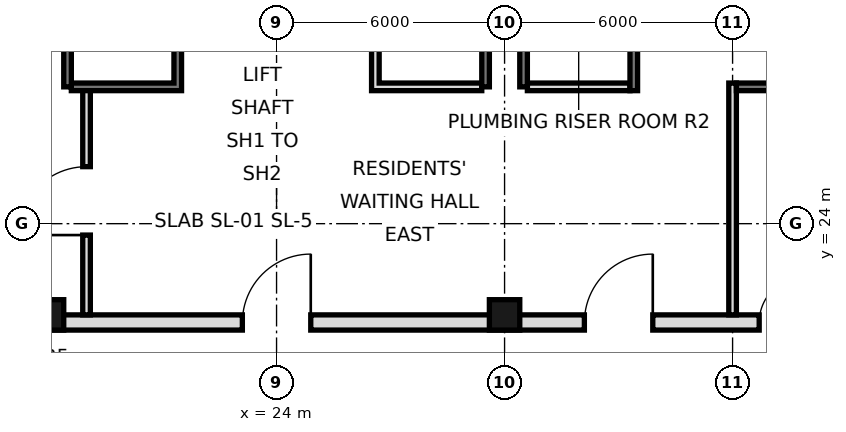
"""IFC4 building model, lengths in metres.
Left out: names, types, materials, properties, quantities, classifications, styles, units other than length and angle.
Written with IfcOpenShell. Run it as: python <this file> out.ifc"""

import sys

from ifc_helpers import new_model, si_unit, direction, frame, frame_2d, origin, origin_2d, place, context, subcontext, project, spatial, rectangle, hollow_rectangle, extrude, element, fill, save


model = new_model("IFC4")
c1 = context("Model", 3, precision=1e-05, world=origin(), true_north=direction((0.0, 1.0)))
c2 = subcontext(c1, "Body", "Model", "MODEL_VIEW")
j1 = project(units=[si_unit("LENGTHUNIT", "METRE"), si_unit("PLANEANGLEUNIT", "RADIAN")], contexts=[c1])
p1 = place(None, origin())
s1 = spatial("IfcSite", under=j1, at=p1, CompositionType="ELEMENT")
p2 = place(p1, origin())
s2 = spatial("IfcBuilding", under=s1, at=p2, CompositionType="ELEMENT")
p3 = place(p2, frame((0.0, 0.0, 34.8)))
s3 = spatial("IfcBuildingStorey", under=s2, at=p3, CompositionType="ELEMENT", Elevation=34.8)
for number, where, z_axis, x_axis in (
    (1, (18.0, 21.6, 0.0), (0.0, 0.0, 1.0), (1.0, 0.0, 0.0)),
    (2, (30.0, 21.6, 0.0), (0.0, 0.0, 1.0), (1.0, 0.0, 0.0)),
):
    element("IfcColumn", number, at=place(p3, frame(where, z_axis=z_axis, x_axis=x_axis)), inside=s3, PredefinedType="COLUMN", context=c2, shape_type="SweptSolid", body=[
        extrude(hollow_rectangle(XDim=0.8, YDim=0.8, WallThickness=0.07, at=origin_2d()), origin(), (0.0, 0.0, 1.0), 4.8),
    ])
for number, where, z_axis, x_axis in (
    (3, (18.5, 27.6, 0.0), (0.0, 0.0, 1.0), (0.0, 1.0, 0.0)),
    (4, (29.5, 27.6, 0.0), (0.0, 0.0, 1.0), (0.0, 1.0, 0.0)),
    (5, (30.5, 27.6, 0.0), (0.0, 0.0, 1.0), (0.0, 1.0, 0.0)),
):
    element("IfcWall", number, at=place(p3, frame(where, z_axis=z_axis, x_axis=x_axis)), inside=s3, PredefinedType="SOLIDWALL", context=c2, shape_type="SweptSolid", body=[
        extrude(rectangle(XDim=17.5, YDim=0.2, at=frame_2d((8.75, 0.0))), origin(), (0.0, 0.0, 1.0), 4.4),
    ])
p4 = place(p3, frame((5.6, 21.4, 0.0), z_axis=(0.0, 0.0, 1.0), x_axis=(1.0, 0.0, 0.0)))
e6 = element("IfcWall", 6, at=p4, inside=s3, PredefinedType="SOLIDWALL", context=c2, shape_type="SweptSolid", body=[
    extrude(rectangle(XDim=36.8, YDim=0.4, at=frame_2d((18.4, 0.0))), origin(), (0.0, 0.0, 1.0), 4.4),
])
p5 = place(p4, frame((8.5, 0.0, 0.0)))
e7 = element("IfcOpeningElement", 7, at=p5, cuts=e6, PredefinedType="OPENING", context=c2, shape_type="SweptSolid", body=[
    extrude(rectangle(XDim=1.8, YDim=2.1, at=frame_2d((0.9, 1.05))), frame((0.0, 0.21, 0.0), z_axis=(0.0, -1.0, 0.0), x_axis=(1.0, 0.0, 0.0)), (0.0, 0.0, 1.0), 0.42),
])
p6 = place(p4, frame((17.5, 0.0, 0.0)))
e8 = element("IfcOpeningElement", 8, at=p6, cuts=e6, PredefinedType="OPENING", context=c2, shape_type="SweptSolid", body=[
    extrude(rectangle(XDim=1.8, YDim=2.1, at=frame_2d((0.9, 1.05))), frame((0.0, 0.21, 0.0), z_axis=(0.0, -1.0, 0.0), x_axis=(1.0, 0.0, 0.0)), (0.0, 0.0, 1.0), 0.42),
])
p7 = place(p4, frame((26.5, 0.0, 0.0)))
e9 = element("IfcOpeningElement", 9, at=p7, cuts=e6, PredefinedType="OPENING", context=c2, shape_type="SweptSolid", body=[
    extrude(rectangle(XDim=1.8, YDim=2.1, at=frame_2d((0.9, 1.05))), frame((0.0, 0.21, 0.0), z_axis=(0.0, -1.0, 0.0), x_axis=(1.0, 0.0, 0.0)), (0.0, 0.0, 1.0), 0.42),
])
p8 = place(p4, frame((4.5, 0.0, 0.0)))
e10 = element("IfcOpeningElement", 10, at=p8, cuts=e6, PredefinedType="OPENING", context=c2, shape_type="SweptSolid", body=[
    extrude(rectangle(XDim=1.2, YDim=2.1, at=frame_2d((0.6, 1.05))), frame((0.0, 0.21, 0.0), z_axis=(0.0, -1.0, 0.0), x_axis=(1.0, 0.0, 0.0)), (0.0, 0.0, 1.0), 0.42),
])
p9 = place(p4, frame((31.1, 0.0, 0.0)))
e11 = element("IfcOpeningElement", 11, at=p9, cuts=e6, PredefinedType="OPENING", context=c2, shape_type="SweptSolid", body=[
    extrude(rectangle(XDim=1.2, YDim=2.1, at=frame_2d((0.6, 1.05))), frame((0.0, 0.21, 0.0), z_axis=(0.0, -1.0, 0.0), x_axis=(1.0, 0.0, 0.0)), (0.0, 0.0, 1.0), 0.42),
])
p10 = place(p3, frame((19.0, 21.6, 0.0), z_axis=(0.0, 0.0, 1.0), x_axis=(0.0, 1.0, 0.0)))
e12 = element("IfcWall", 12, at=p10, inside=s3, PredefinedType="PARTITIONING", context=c2, shape_type="SweptSolid", body=[
    extrude(rectangle(XDim=6.0, YDim=0.2, at=frame_2d((3.0, 0.0))), origin(), (0.0, 0.0, 1.0), 4.4),
])
p11 = place(p10, frame((2.1, 0.0, 0.0)))
e13 = element("IfcOpeningElement", 13, at=p11, cuts=e12, PredefinedType="OPENING", context=c2, shape_type="SweptSolid", body=[
    extrude(rectangle(XDim=1.8, YDim=2.1, at=frame_2d((0.9, 1.05))), frame((0.0, 0.11, 0.0), z_axis=(0.0, -1.0, 0.0), x_axis=(1.0, 0.0, 0.0)), (0.0, 0.0, 1.0), 0.22),
])
p12 = place(p3, frame((21.4, 27.5, 0.0), z_axis=(0.0, 0.0, 1.0), x_axis=(0.0, 1.0, 0.0)))
e14 = element("IfcWall", 14, at=p12, inside=s3, PredefinedType="SOLIDWALL", context=c2, shape_type="SweptSolid", body=[
    extrude(rectangle(XDim=17.5, YDim=0.2, at=frame_2d((8.75, 0.0))), origin(), (0.0, 0.0, 1.0), 4.4),
])
p13 = place(p12, frame((16.2, 0.0, 0.0)))
e15 = element("IfcOpeningElement", 15, at=p13, cuts=e14, PredefinedType="OPENING", context=c2, shape_type="SweptSolid", body=[
    extrude(rectangle(XDim=1.0, YDim=2.1, at=frame_2d((0.5, 1.05))), frame((0.0, 0.11, 0.0), z_axis=(0.0, -1.0, 0.0), x_axis=(1.0, 0.0, 0.0)), (0.0, 0.0, 1.0), 0.22),
])
p14 = place(p12, frame((7.4, 0.0, 0.0)))
e16 = element("IfcOpeningElement", 16, at=p14, cuts=e14, PredefinedType="OPENING", context=c2, shape_type="SweptSolid", body=[
    extrude(rectangle(XDim=0.9, YDim=2.1, at=frame_2d((0.45, 1.05))), frame((0.0, 0.11, 0.0), z_axis=(0.0, -1.0, 0.0), x_axis=(1.0, 0.0, 0.0)), (0.0, 0.0, 1.0), 0.22),
])
p15 = place(p3, frame((26.6, 27.5, 0.0), z_axis=(0.0, 0.0, 1.0), x_axis=(0.0, 1.0, 0.0)))
e17 = element("IfcWall", 17, at=p15, inside=s3, PredefinedType="SOLIDWALL", context=c2, shape_type="SweptSolid", body=[
    extrude(rectangle(XDim=17.5, YDim=0.2, at=frame_2d((8.75, 0.0))), origin(), (0.0, 0.0, 1.0), 4.4),
])
p16 = place(p15, frame((4.3, 0.0, 0.0)))
e18 = element("IfcOpeningElement", 18, at=p16, cuts=e17, PredefinedType="OPENING", context=c2, shape_type="SweptSolid", body=[
    extrude(rectangle(XDim=0.9, YDim=2.1, at=frame_2d((0.45, 1.05))), frame((0.0, 0.11, 0.0), z_axis=(0.0, -1.0, 0.0), x_axis=(1.0, 0.0, 0.0)), (0.0, 0.0, 1.0), 0.22),
])
p17 = place(p15, frame((10.35, 0.0, 0.0)))
e19 = element("IfcOpeningElement", 19, at=p17, cuts=e17, PredefinedType="OPENING", context=c2, shape_type="SweptSolid", body=[
    extrude(rectangle(XDim=1.0, YDim=2.1, at=frame_2d((0.5, 1.05))), frame((0.0, 0.11, 0.0), z_axis=(0.0, -1.0, 0.0), x_axis=(1.0, 0.0, 0.0)), (0.0, 0.0, 1.0), 0.22),
])
p18 = place(p3, frame((33.4, 27.5, 0.0), z_axis=(0.0, 0.0, 1.0), x_axis=(0.0, 1.0, 0.0)))
e20 = element("IfcWall", 20, at=p18, inside=s3, PredefinedType="SOLIDWALL", context=c2, shape_type="SweptSolid", body=[
    extrude(rectangle(XDim=17.5, YDim=0.2, at=frame_2d((8.75, 0.0))), origin(), (0.0, 0.0, 1.0), 4.4),
])
p19 = place(p18, frame((15.4, 0.0, 0.0)))
e21 = element("IfcOpeningElement", 21, at=p19, cuts=e20, PredefinedType="OPENING", context=c2, shape_type="SweptSolid", body=[
    extrude(rectangle(XDim=1.1, YDim=2.1, at=frame_2d((0.55, 1.05))), frame((0.0, 0.11, 0.0), z_axis=(0.0, -1.0, 0.0), x_axis=(1.0, 0.0, 0.0)), (0.0, 0.0, 1.0), 0.22),
])
p20 = place(p18, frame((2.7, 0.0, 0.0)))
e22 = element("IfcOpeningElement", 22, at=p20, cuts=e20, PredefinedType="OPENING", context=c2, shape_type="SweptSolid", body=[
    extrude(rectangle(XDim=1.0, YDim=2.1, at=frame_2d((0.5, 1.05))), frame((0.0, 0.11, 0.0), z_axis=(0.0, -1.0, 0.0), x_axis=(1.0, 0.0, 0.0)), (0.0, 0.0, 1.0), 0.22),
])
p21 = place(p18, frame((9.9, 0.0, 0.0)))
e23 = element("IfcOpeningElement", 23, at=p21, cuts=e20, PredefinedType="OPENING", context=c2, shape_type="SweptSolid", body=[
    extrude(rectangle(XDim=0.9, YDim=2.1, at=frame_2d((0.45, 1.05))), frame((0.0, 0.11, 0.0), z_axis=(0.0, -1.0, 0.0), x_axis=(1.0, 0.0, 0.0)), (0.0, 0.0, 1.0), 0.22),
])
p22 = place(p3, frame((36.0, 21.6, 0.0), z_axis=(0.0, 0.0, 1.0), x_axis=(0.0, 1.0, 0.0)))
e24 = element("IfcWall", 24, at=p22, inside=s3, PredefinedType="PARTITIONING", context=c2, shape_type="SweptSolid", body=[
    extrude(rectangle(XDim=6.1, YDim=0.2, at=frame_2d((3.05, 0.0))), origin(), (0.0, 0.0, 1.0), 4.4),
])
for number, where, z_axis, x_axis in (
    (25, (18.6, 27.6, 0.0), (0.0, 0.0, 1.0), (1.0, 0.0, 0.0)),
    (26, (26.7, 27.6, 0.0), (0.0, 0.0, 1.0), (1.0, 0.0, 0.0)),
):
    element("IfcWall", number, at=place(p3, frame(where, z_axis=z_axis, x_axis=x_axis)), inside=s3, PredefinedType="SOLIDWALL", context=c2, shape_type="SweptSolid", body=[
        extrude(rectangle(XDim=2.7, YDim=0.2, at=frame_2d((1.35, 0.0))), origin(), (0.0, 0.0, 1.0), 4.4),
    ])
p23 = place(p3, frame((30.6, 27.6, 0.0), z_axis=(0.0, 0.0, 1.0), x_axis=(1.0, 0.0, 0.0)))
e27 = element("IfcWall", 27, at=p23, inside=s3, PredefinedType="PARTITIONING", context=c2, shape_type="SweptSolid", body=[
    extrude(rectangle(XDim=2.7, YDim=0.2, at=frame_2d((1.35, 0.0))), origin(), (0.0, 0.0, 1.0), 4.4),
])
p24 = place(p3, frame((36.1, 27.6, 0.0), z_axis=(0.0, 0.0, 1.0), x_axis=(1.0, 0.0, 0.0)))
e28 = element("IfcWall", 28, at=p24, inside=s3, PredefinedType="SOLIDWALL", context=c2, shape_type="SweptSolid", body=[
    extrude(rectangle(XDim=5.3, YDim=0.2, at=frame_2d((2.65, 0.0))), origin(), (0.0, 0.0, 1.0), 4.4),
])
p25 = place(p11, origin())
e29 = element("IfcDoor", 29, at=p25, inside=s3, OperationType="SINGLE_SWING_LEFT", PredefinedType="DOOR", context=c2, shape_type="SweptSolid", body=[
    extrude(rectangle(XDim=1.8, YDim=2.1, at=frame_2d((0.9, 1.05))), frame((0.0, 0.025, 0.0), z_axis=(0.0, -1.0, 0.0), x_axis=(1.0, 0.0, 0.0)), (0.0, 0.0, 1.0), 0.05),
])
fill(e13, e29)
p26 = place(p6, frame((1.8, 0.0, 0.0), z_axis=(0.0, 0.0, 1.0), x_axis=(-1.0, 0.0, 0.0)))
e30 = element("IfcDoor", 30, at=p26, inside=s3, OperationType="SINGLE_SWING_LEFT", PredefinedType="DOOR", context=c2, shape_type="SweptSolid", body=[
    extrude(rectangle(XDim=1.8, YDim=2.1, at=frame_2d((0.9, 1.05))), frame((0.0, 0.025, 0.0), z_axis=(0.0, -1.0, 0.0), x_axis=(1.0, 0.0, 0.0)), (0.0, 0.0, 1.0), 0.05),
])
fill(e8, e30)
p27 = place(p7, frame((1.8, 0.0, 0.0), z_axis=(0.0, 0.0, 1.0), x_axis=(-1.0, 0.0, 0.0)))
e31 = element("IfcDoor", 31, at=p27, inside=s3, OperationType="SINGLE_SWING_LEFT", PredefinedType="DOOR", context=c2, shape_type="SweptSolid", body=[
    extrude(rectangle(XDim=1.8, YDim=2.1, at=frame_2d((0.9, 1.05))), frame((0.0, 0.025, 0.0), z_axis=(0.0, -1.0, 0.0), x_axis=(1.0, 0.0, 0.0)), (0.0, 0.0, 1.0), 0.05),
])
fill(e9, e31)
p28 = place(p9, frame((1.2, 0.0, 0.0), z_axis=(0.0, 0.0, 1.0), x_axis=(-1.0, 0.0, 0.0)))
e32 = element("IfcDoor", 32, at=p28, inside=s3, OperationType="SINGLE_SWING_LEFT", PredefinedType="DOOR", context=c2, shape_type="SweptSolid", body=[
    extrude(rectangle(XDim=1.2, YDim=2.1, at=frame_2d((0.6, 1.05))), frame((0.0, 0.025, 0.0), z_axis=(0.0, -1.0, 0.0), x_axis=(1.0, 0.0, 0.0)), (0.0, 0.0, 1.0), 0.05),
])
fill(e11, e32)
save(model, sys.argv[1])
